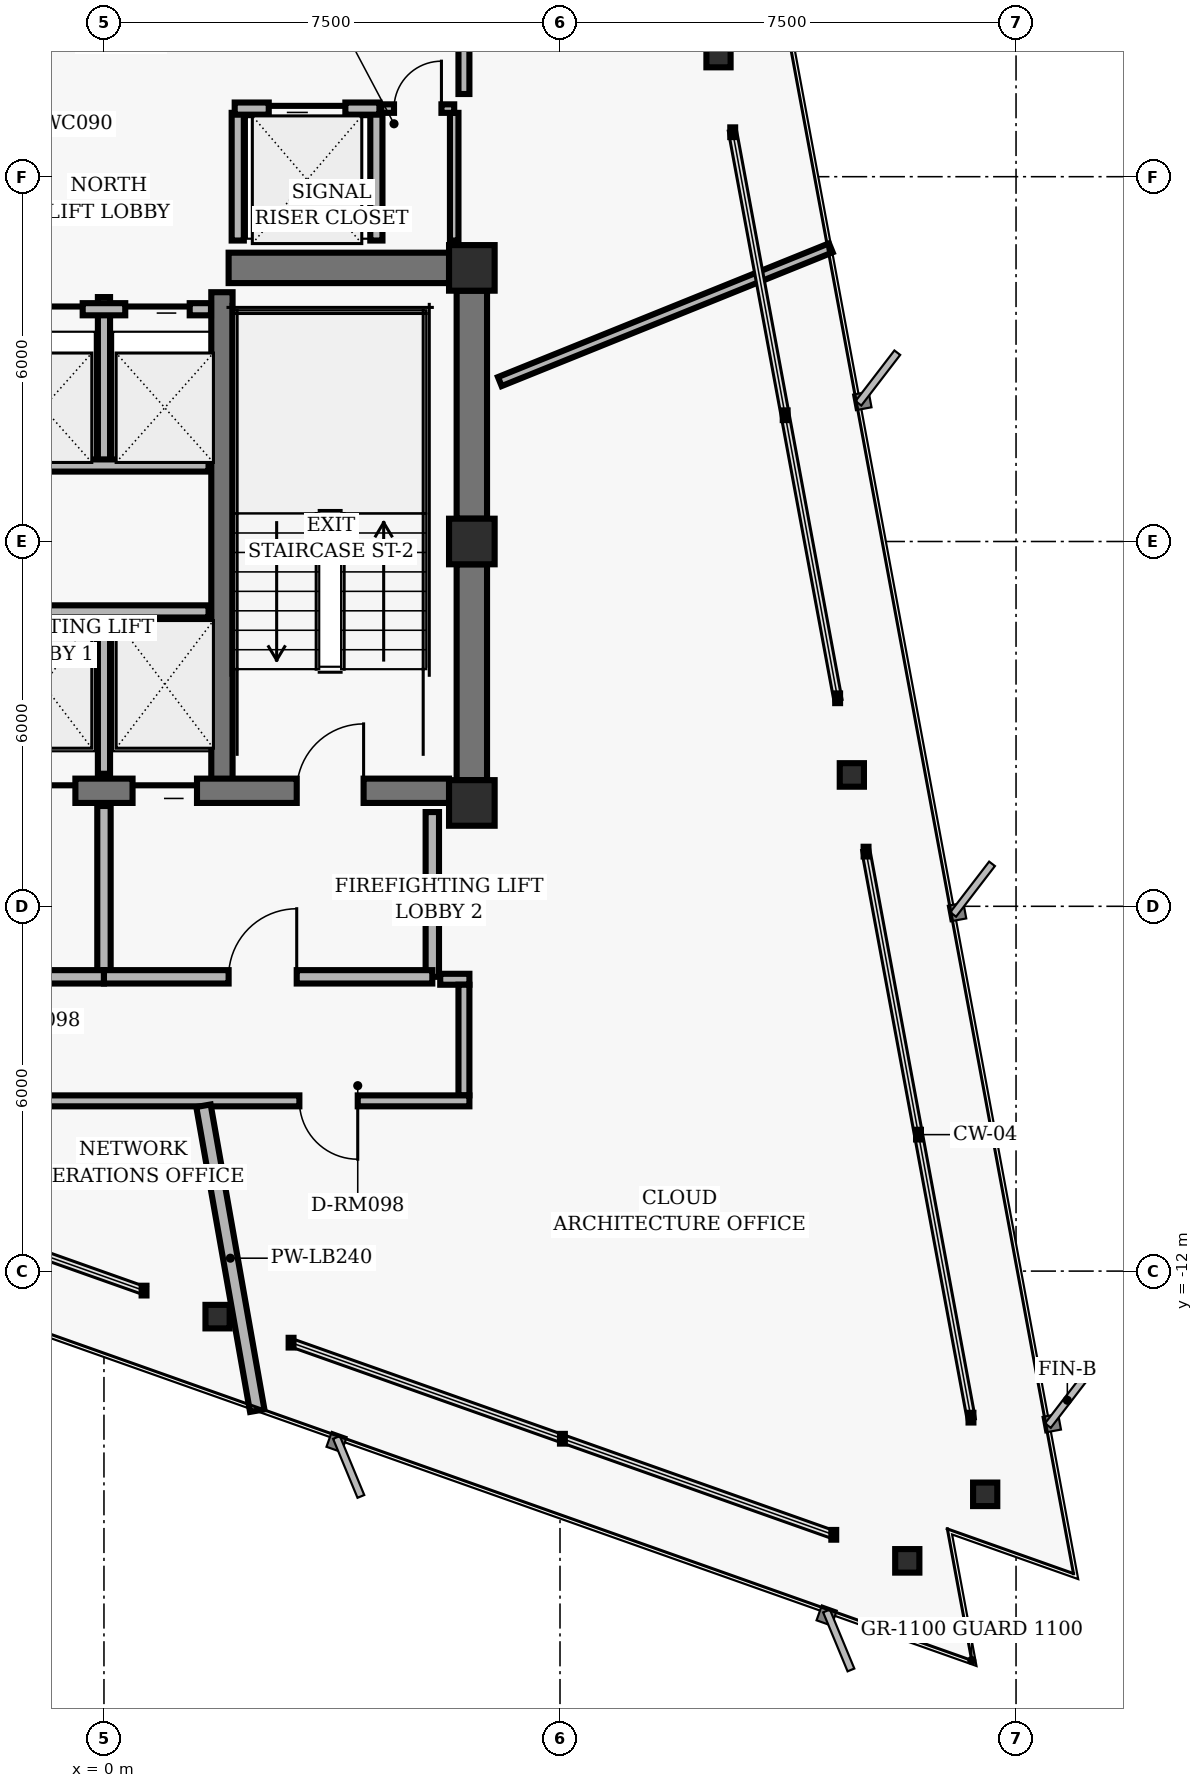
"""IFC4 building model, lengths in metres.
Left out: names, types, materials, properties, quantities, classifications, styles, units other than length and angle.
Written with IfcOpenShell. Run it as: python <this file> out.ifc"""

import sys

from ifc_helpers import new_model, si_unit, direction, frame, frame_2d, origin, origin_2d, place, context, subcontext, project, spatial, rectangle, hollow_rectangle, i_section, extrude, element, fill, save


model = new_model("IFC4")
c1 = context("Model", 3, precision=1e-05, world=origin(), true_north=direction((0.0, 1.0)))
c2 = subcontext(c1, "Body", "Model", "MODEL_VIEW")
j1 = project(units=[si_unit("LENGTHUNIT", "METRE"), si_unit("PLANEANGLEUNIT", "RADIAN")], contexts=[c1])
p1 = place(None, origin())
s1 = spatial("IfcSite", under=j1, at=p1, CompositionType="ELEMENT")
p2 = place(p1, origin())
s2 = spatial("IfcBuilding", under=s1, at=p2, CompositionType="ELEMENT")
p3 = place(p2, frame((0.0, 0.0, 184.48)))
s3 = spatial("IfcBuildingStorey", under=s2, at=p3, CompositionType="ELEMENT", Elevation=184.48)
for number, where, z_axis, x_axis in (
    (1, (6.05, 4.5, 0.0), (0.0, 0.0, 1.0), (1.0, 0.0, 0.0)),
    (2, (6.05, 0.0, 0.0), (0.0, 0.0, 1.0), (1.0, 0.0, 0.0)),
    (3, (6.05, -4.3, 0.0), (0.0, 0.0, 1.0), (1.0, 0.0, 0.0)),
):
    element("IfcColumn", number, at=place(p3, frame(where, z_axis=z_axis, x_axis=x_axis)), inside=s3, PredefinedType="COLUMN", context=c2, shape_type="SweptSolid", body=[
        extrude(hollow_rectangle(XDim=0.75, YDim=0.75, WallThickness=0.05, InnerFilletRadius=0.02, OuterFilletRadius=0.04, at=origin_2d()), origin(), (0.0, 0.0, 1.0), 3.04),
    ])
p4 = place(p3, frame((6.05, 0.375, 0.0), z_axis=(0.0, 0.0, 1.0), x_axis=(0.0, 1.0, 0.0)))
e4 = element("IfcWall", 4, at=p4, inside=s3, PredefinedType="SHEAR", context=c2, shape_type="SweptSolid", body=[
    extrude(rectangle(XDim=3.75, YDim=0.5, at=frame_2d((1.875, 0.0))), origin(), (0.0, 0.0, 1.0), 2.798),
])
p5 = place(p3, frame((6.05, -3.925, 0.0), z_axis=(0.0, 0.0, 1.0), x_axis=(0.0, 1.0, 0.0)))
e5 = element("IfcWall", 5, at=p5, inside=s3, PredefinedType="SHEAR", context=c2, shape_type="SweptSolid", body=[
    extrude(rectangle(XDim=3.55, YDim=0.5, at=frame_2d((1.775, 0.0))), origin(), (0.0, 0.0, 1.0), 2.798),
])
p6 = place(p3, frame((1.94, -4.1, 0.0), z_axis=(0.0, 0.0, 1.0), x_axis=(0.0, 1.0, 0.0)))
e6 = element("IfcWall", 6, at=p6, inside=s3, PredefinedType="SHEAR", context=c2, shape_type="SweptSolid", body=[
    extrude(rectangle(XDim=8.2, YDim=0.35, at=frame_2d((4.1, 0.0))), origin(), (0.0, 0.0, 1.0), 2.798),
])
p7 = place(p3, frame((-5.675, -4.1, 0.0), z_axis=(0.0, 0.0, 1.0), x_axis=(1.0, 0.0, 0.0)))
e7 = element("IfcWall", 7, at=p7, inside=s3, PredefinedType="SHEAR", context=c2, shape_type="SweptSolid", body=[
    extrude(rectangle(XDim=11.35, YDim=0.4, at=frame_2d((5.675, 0.0))), origin(), (0.0, 0.0, 1.0), 2.798),
])
p8 = place(p7, frame((1.405, 0.0, 0.0)))
e8 = element("IfcOpeningElement", 8, at=p8, cuts=e7, PredefinedType="OPENING", context=c2, shape_type="SweptSolid", body=[
    extrude(rectangle(XDim=1.1, YDim=2.04, at=frame_2d((0.55, 1.02))), frame((0.0, 0.21, 0.0), z_axis=(0.0, -1.0, 0.0), x_axis=(1.0, 0.0, 0.0)), (0.0, 0.0, 1.0), 0.42),
])
p9 = place(p7, frame((8.845, 0.0, 0.0)))
e9 = element("IfcOpeningElement", 9, at=p9, cuts=e7, PredefinedType="OPENING", context=c2, shape_type="SweptSolid", body=[
    extrude(rectangle(XDim=1.1, YDim=2.04, at=frame_2d((0.55, 1.02))), frame((0.0, 0.21, 0.0), z_axis=(0.0, -1.0, 0.0), x_axis=(1.0, 0.0, 0.0)), (0.0, 0.0, 1.0), 0.42),
])
p10 = place(p7, frame((4.145, 0.0, 0.0)))
e10 = element("IfcOpeningElement", 10, at=p10, cuts=e7, PredefinedType="OPENING", context=c2, shape_type="SweptSolid", body=[
    extrude(rectangle(XDim=1.06, YDim=2.04, at=frame_2d((0.53, 1.02))), frame((0.0, 0.21, 0.0), z_axis=(0.0, -1.0, 0.0), x_axis=(1.0, 0.0, 0.0)), (0.0, 0.0, 1.0), 0.42),
])
p11 = place(p7, frame((6.145, 0.0, 0.0)))
e11 = element("IfcOpeningElement", 11, at=p11, cuts=e7, PredefinedType="OPENING", context=c2, shape_type="SweptSolid", body=[
    extrude(rectangle(XDim=1.06, YDim=2.04, at=frame_2d((0.53, 1.02))), frame((0.0, 0.21, 0.0), z_axis=(0.0, -1.0, 0.0), x_axis=(1.0, 0.0, 0.0)), (0.0, 0.0, 1.0), 0.42),
])
p12 = place(p3, frame((2.05, 4.5, 0.0), z_axis=(0.0, 0.0, 1.0), x_axis=(1.0, 0.0, 0.0)))
e12 = element("IfcWall", 12, at=p12, inside=s3, PredefinedType="SHEAR", context=c2, shape_type="SweptSolid", body=[
    extrude(rectangle(XDim=3.625, YDim=0.5, at=frame_2d((1.812, 0.0))), origin(), (0.0, 0.0, 1.0), 2.798),
])
for number, where, z_axis, x_axis in (
    (13, (14.492, -15.671, 0.0), (0.0, 0.0, 1.0), (1.0, 0.0, 0.0)),
    (14, (12.3, -3.84, 0.0), (0.0, 0.0, 1.0), (1.0, 0.0, 0.0)),
    (15, (10.107, 7.992, 0.0), (0.0, 0.0, 1.0), (1.0, 0.0, 0.0)),
    (16, (1.868, -12.749, 0.0), (0.0, 0.0, 1.0), (1.0, 0.0, 0.0)),
    (17, (13.211, -16.766, 0.0), (0.0, 0.0, 1.0), (1.0, 0.0, 0.0)),
):
    element("IfcColumn", number, at=place(p3, frame(where, z_axis=z_axis, x_axis=x_axis)), inside=s3, PredefinedType="COLUMN", context=c2, shape_type="SweptSolid", body=[
        extrude(i_section(OverallWidth=0.398, OverallDepth=0.387, WebThickness=0.021, FlangeThickness=0.033, FilletRadius=0.018, at=origin_2d()), origin(), (0.0, 0.0, 1.0), 3.04),
    ])
p13 = place(p3, frame((0.0, -3.82, 0.0), z_axis=(0.0, 0.0, 1.0), x_axis=(0.0, 1.0, 0.0)))
e18 = element("IfcWall", 18, at=p13, inside=s3, PredefinedType="PARTITIONING", context=c2, shape_type="SweptSolid", body=[
    extrude(rectangle(XDim=2.67, YDim=0.2, at=frame_2d((1.335, 0.0))), origin(), (0.0, 0.0, 1.0), 2.773),
])
p14 = place(p3, frame((-1.72, -1.15, 0.0), z_axis=(0.0, 0.0, 1.0), x_axis=(1.0, 0.0, 0.0)))
e19 = element("IfcWall", 19, at=p14, inside=s3, PredefinedType="PARTITIONING", context=c2, shape_type="SweptSolid", body=[
    extrude(rectangle(XDim=3.44, YDim=0.2, at=frame_2d((1.72, 0.0))), origin(), (0.0, 0.0, 1.0), 2.773),
])
p15 = place(p3, frame((5.4, -7.16, 0.0), z_axis=(0.0, 0.0, 1.0), x_axis=(0.0, 1.0, 0.0)))
e20 = element("IfcWall", 20, at=p15, inside=s3, PredefinedType="PARTITIONING", context=c2, shape_type="SweptSolid", body=[
    extrude(rectangle(XDim=2.71, YDim=0.22, at=frame_2d((1.355, 0.0))), origin(), (0.0, 0.0, 1.0), 2.773),
])
p16 = place(p3, frame((0.0, -7.16, 0.0), z_axis=(0.0, 0.0, 1.0), x_axis=(0.0, 1.0, 0.0)))
e21 = element("IfcWall", 21, at=p16, inside=s3, PredefinedType="PARTITIONING", context=c2, shape_type="SweptSolid", body=[
    extrude(rectangle(XDim=2.81, YDim=0.22, at=frame_2d((1.405, 0.0))), origin(), (0.0, 0.0, 1.0), 2.773),
])
p17 = place(p3, frame((-5.4, -7.16, 0.0), z_axis=(0.0, 0.0, 1.0), x_axis=(1.0, 0.0, 0.0)))
e22 = element("IfcWall", 22, at=p17, inside=s3, PredefinedType="PARTITIONING", context=c2, shape_type="SweptSolid", body=[
    extrude(rectangle(XDim=5.4, YDim=0.22, at=frame_2d((2.7, 0.0))), origin(), (0.0, 0.0, 1.0), 2.395),
])
p18 = place(p17, frame((2.05, 0.0, 0.0)))
e23 = element("IfcOpeningElement", 23, at=p18, cuts=e22, PredefinedType="OPENING", context=c2, shape_type="SweptSolid", body=[
    extrude(rectangle(XDim=1.12, YDim=2.02, at=frame_2d((0.56, 1.01))), frame((0.0, 0.12, 0.0), z_axis=(0.0, -1.0, 0.0), x_axis=(1.0, 0.0, 0.0)), (0.0, 0.0, 1.0), 0.24),
])
p19 = place(p3, frame((0.0, -7.16, 0.0), z_axis=(0.0, 0.0, 1.0), x_axis=(1.0, 0.0, 0.0)))
e24 = element("IfcWall", 24, at=p19, inside=s3, PredefinedType="PARTITIONING", context=c2, shape_type="SweptSolid", body=[
    extrude(rectangle(XDim=5.4, YDim=0.22, at=frame_2d((2.7, 0.0))), origin(), (0.0, 0.0, 1.0), 2.395),
])
p20 = place(p19, frame((2.05, 0.0, 0.0)))
e25 = element("IfcOpeningElement", 25, at=p20, cuts=e24, PredefinedType="OPENING", context=c2, shape_type="SweptSolid", body=[
    extrude(rectangle(XDim=1.12, YDim=2.02, at=frame_2d((0.56, 1.01))), frame((0.0, 0.12, 0.0), z_axis=(0.0, -1.0, 0.0), x_axis=(1.0, 0.0, 0.0)), (0.0, 0.0, 1.0), 0.24),
])
p21 = place(p3, frame((0.0, 1.25, 0.0), z_axis=(0.0, 0.0, 1.0), x_axis=(0.0, 1.0, 0.0)))
e26 = element("IfcWall", 26, at=p21, inside=s3, PredefinedType="PARTITIONING", context=c2, shape_type="SweptSolid", body=[
    extrude(rectangle(XDim=2.77, YDim=0.2, at=frame_2d((1.385, 0.0))), origin(), (0.0, 0.0, 1.0), 2.773),
])
p22 = place(p3, frame((-1.72, 1.25, 0.0), z_axis=(0.0, 0.0, 1.0), x_axis=(1.0, 0.0, 0.0)))
e27 = element("IfcWall", 27, at=p22, inside=s3, PredefinedType="PARTITIONING", context=c2, shape_type="SweptSolid", body=[
    extrude(rectangle(XDim=3.44, YDim=0.2, at=frame_2d((1.72, 0.0))), origin(), (0.0, 0.0, 1.0), 2.773),
])
p23 = place(p3, frame((-1.76, 3.82, 0.0), z_axis=(0.0, 0.0, 1.0), x_axis=(1.0, 0.0, 0.0)))
e28 = element("IfcWall", 28, at=p23, inside=s3, PredefinedType="PARTITIONING", context=c2, shape_type="SweptSolid", body=[
    extrude(rectangle(XDim=3.52, YDim=0.2, at=frame_2d((1.76, 0.0))), origin(), (0.0, 0.0, 1.0), 2.773),
])
p24 = place(p23, frame((0.35, 0.0, 0.0)))
e29 = element("IfcOpeningElement", 29, at=p24, cuts=e28, PredefinedType="OPENING", context=c2, shape_type="SweptSolid", body=[
    extrude(rectangle(XDim=1.06, YDim=2.04, at=frame_2d((0.53, 1.02))), frame((0.0, 0.11, 0.0), z_axis=(0.0, -1.0, 0.0), x_axis=(1.0, 0.0, 0.0)), (0.0, 0.0, 1.0), 0.22),
])
p25 = place(p23, frame((2.11, 0.0, 0.0)))
e30 = element("IfcOpeningElement", 30, at=p25, cuts=e28, PredefinedType="OPENING", context=c2, shape_type="SweptSolid", body=[
    extrude(rectangle(XDim=1.06, YDim=2.04, at=frame_2d((0.53, 1.02))), frame((0.0, 0.11, 0.0), z_axis=(0.0, -1.0, 0.0), x_axis=(1.0, 0.0, 0.0)), (0.0, 0.0, 1.0), 0.22),
])
for number, where, z_axis, x_axis in (
    (31, (2.2, 4.95, 0.0), (0.0, 0.0, 1.0), (0.0, 1.0, 0.0)),
    (32, (4.48, 4.95, 0.0), (0.0, 0.0, 1.0), (0.0, 1.0, 0.0)),
):
    element("IfcWall", number, at=place(p3, frame(where, z_axis=z_axis, x_axis=x_axis)), inside=s3, PredefinedType="PARTITIONING", context=c2, shape_type="SweptSolid", body=[
        extrude(rectangle(XDim=2.1, YDim=0.2, at=frame_2d((1.05, 0.0))), origin(), (0.0, 0.0, 1.0), 2.773),
    ])
p26 = place(p3, frame((2.15, 7.12, 0.0), z_axis=(0.0, 0.0, 1.0), x_axis=(1.0, 0.0, 0.0)))
e33 = element("IfcWall", 33, at=p26, inside=s3, PredefinedType="PARTITIONING", context=c2, shape_type="SweptSolid", body=[
    extrude(rectangle(XDim=2.38, YDim=0.2, at=frame_2d((1.19, 0.0))), origin(), (0.0, 0.0, 1.0), 2.773),
])
p27 = place(p26, frame((0.56, 0.0, 0.0)))
e34 = element("IfcOpeningElement", 34, at=p27, cuts=e33, PredefinedType="OPENING", context=c2, shape_type="SweptSolid", body=[
    extrude(rectangle(XDim=1.26, YDim=2.06, at=frame_2d((0.63, 1.03))), frame((0.0, 0.11, 0.0), z_axis=(0.0, -1.0, 0.0), x_axis=(1.0, 0.0, 0.0)), (0.0, 0.0, 1.0), 0.22),
])
p28 = place(p3, frame((5.76, 4.95, 0.0), z_axis=(0.0, 0.0, 1.0), x_axis=(0.0, 1.0, 0.0)))
e35 = element("IfcWall", 35, at=p28, inside=s3, PredefinedType="PARTITIONING", context=c2, shape_type="SweptSolid", body=[
    extrude(rectangle(XDim=2.1, YDim=0.14, at=frame_2d((1.05, 0.0))), origin(), (0.0, 0.0, 1.0), 2.253),
])
p29 = place(p3, frame((4.56, 7.12, 0.0), z_axis=(0.0, 0.0, 1.0), x_axis=(1.0, 0.0, 0.0)))
e36 = element("IfcWall", 36, at=p29, inside=s3, PredefinedType="PARTITIONING", context=c2, shape_type="SweptSolid", body=[
    extrude(rectangle(XDim=1.2, YDim=0.14, at=frame_2d((0.6, 0.0))), origin(), (0.0, 0.0, 1.0), 2.773),
])
p30 = place(p29, frame((0.21, 0.0, 0.0)))
e37 = element("IfcOpeningElement", 37, at=p30, cuts=e36, PredefinedType="OPENING", context=c2, shape_type="SweptSolid", body=[
    extrude(rectangle(XDim=0.78, YDim=2.01, at=frame_2d((0.39, 1.005))), frame((0.0, 0.08, 0.0), z_axis=(0.0, -1.0, 0.0), x_axis=(1.0, 0.0, 0.0)), (0.0, 0.0, 1.0), 0.16),
])
p31 = place(p3, frame((5.92, 9.16, 0.0), z_axis=(0.0, 0.0, 1.0), x_axis=(0.0, -1.0, 0.0)))
e38 = element("IfcWall", 38, at=p31, inside=s3, PredefinedType="PARTITIONING", context=c2, shape_type="SweptSolid", body=[
    extrude(rectangle(XDim=1.8, YDim=0.18, at=frame_2d((0.9, 0.0))), origin(), (0.0, 0.0, 1.0), 2.253),
])
p32 = place(p3, frame((5.53, -7.2, 0.0), z_axis=(0.0, 0.0, 1.0), x_axis=(1.0, 0.0, 0.0)))
e39 = element("IfcWall", 39, at=p32, inside=s3, PredefinedType="PARTITIONING", context=c2, shape_type="SweptSolid", body=[
    extrude(rectangle(XDim=0.48, YDim=0.18, at=frame_2d((0.24, 0.0))), origin(), (0.0, 0.0, 1.0), 2.773),
])
p33 = place(p3, frame((5.92, -7.29, 0.0), z_axis=(0.0, 0.0, 1.0), x_axis=(0.0, -1.0, 0.0)))
e40 = element("IfcWall", 40, at=p33, inside=s3, PredefinedType="PARTITIONING", context=c2, shape_type="SweptSolid", body=[
    extrude(rectangle(XDim=1.82, YDim=0.18, at=frame_2d((0.91, 0.0))), origin(), (0.0, 0.0, 1.0), 2.773),
])
p34 = place(p3, frame((6.01, -9.2, 0.0), z_axis=(0.0, 0.0, 1.0), x_axis=(-1.0, 0.0, 0.0)))
e41 = element("IfcWall", 41, at=p34, inside=s3, PredefinedType="PARTITIONING", context=c2, shape_type="SweptSolid", body=[
    extrude(rectangle(XDim=13.3, YDim=0.18, at=frame_2d((6.65, 0.0))), origin(), (0.0, 0.0, 1.0), 2.395),
])
p35 = place(p34, frame((8.227, 0.0, 0.0)))
e42 = element("IfcOpeningElement", 42, at=p35, cuts=e41, PredefinedType="OPENING", context=c2, shape_type="SweptSolid", body=[
    extrude(rectangle(XDim=0.96, YDim=2.02, at=frame_2d((0.48, 1.01))), frame((0.0, 0.1, 0.0), z_axis=(0.0, -1.0, 0.0), x_axis=(1.0, 0.0, 0.0)), (0.0, 0.0, 1.0), 0.2),
])
p36 = place(p34, frame((1.836, 0.0, 0.0)))
e43 = element("IfcOpeningElement", 43, at=p36, cuts=e41, PredefinedType="OPENING", context=c2, shape_type="SweptSolid", body=[
    extrude(rectangle(XDim=0.96, YDim=2.02, at=frame_2d((0.48, 1.01))), frame((0.0, 0.1, 0.0), z_axis=(0.0, -1.0, 0.0), x_axis=(1.0, 0.0, 0.0)), (0.0, 0.0, 1.0), 0.2),
])
p37 = place(p3, frame((1.636, -9.28, 0.0), z_axis=(0.0, 0.0, 1.0), x_axis=(0.173634919368, -0.984810090716, 0.0)))
e44 = element("IfcWall", 44, at=p37, inside=s3, PredefinedType="PARTITIONING", context=c2, shape_type="SweptSolid", body=[
    extrude(rectangle(XDim=5.093, YDim=0.24, at=frame_2d((2.546, 0.0))), origin(), (0.0, 0.0, 1.0), 2.773),
])
p38 = place(p3, frame((6.51, 2.63, 0.0), z_axis=(0.0, 0.0, 1.0), x_axis=(0.927189354085, 0.374592981342, 0.0)))
e45 = element("IfcWall", 45, at=p38, inside=s3, PredefinedType="PARTITIONING", context=c2, shape_type="SweptSolid", body=[
    extrude(rectangle(XDim=5.872, YDim=0.16, at=frame_2d((2.936, 0.0))), origin(), (0.0, 0.0, 1.0), 2.773),
])
p39 = place(p9, origin())
e46 = element("IfcDoor", 46, at=p39, inside=s3, OperationType="SINGLE_SWING_RIGHT", PredefinedType="DOOR", context=c2, shape_type="SweptSolid", body=[
    extrude(rectangle(XDim=1.1, YDim=2.04, at=frame_2d((0.55, 1.02))), frame((0.0, 0.025, 0.0), z_axis=(0.0, -1.0, 0.0), x_axis=(1.0, 0.0, 0.0)), (0.0, 0.0, 1.0), 0.05),
])
fill(e9, e46)
p40 = place(p10, origin())
e47 = element("IfcDoor", 47, at=p40, inside=s3, OperationType="SLIDING_TO_LEFT", PredefinedType="DOOR", context=c2, shape_type="SweptSolid", body=[
    extrude(rectangle(XDim=1.06, YDim=2.04, at=frame_2d((0.53, 1.02))), frame((0.0, 0.025, 0.0), z_axis=(0.0, -1.0, 0.0), x_axis=(1.0, 0.0, 0.0)), (0.0, 0.0, 1.0), 0.05),
])
fill(e10, e47)
p41 = place(p11, origin())
e48 = element("IfcDoor", 48, at=p41, inside=s3, OperationType="SLIDING_TO_RIGHT", PredefinedType="DOOR", context=c2, shape_type="SweptSolid", body=[
    extrude(rectangle(XDim=1.06, YDim=2.04, at=frame_2d((0.53, 1.02))), frame((0.0, 0.025, 0.0), z_axis=(0.0, -1.0, 0.0), x_axis=(1.0, 0.0, 0.0)), (0.0, 0.0, 1.0), 0.05),
])
fill(e11, e48)
p42 = place(p20, origin())
e49 = element("IfcDoor", 49, at=p42, inside=s3, OperationType="SINGLE_SWING_RIGHT", PredefinedType="DOOR", context=c2, shape_type="SweptSolid", body=[
    extrude(rectangle(XDim=1.12, YDim=2.02, at=frame_2d((0.56, 1.01))), frame((0.0, 0.025, 0.0), z_axis=(0.0, -1.0, 0.0), x_axis=(1.0, 0.0, 0.0)), (0.0, 0.0, 1.0), 0.05),
])
fill(e25, e49)
p43 = place(p24, origin())
e50 = element("IfcDoor", 50, at=p43, inside=s3, OperationType="SLIDING_TO_LEFT", PredefinedType="DOOR", context=c2, shape_type="SweptSolid", body=[
    extrude(rectangle(XDim=1.06, YDim=2.04, at=frame_2d((0.53, 1.02))), frame((0.0, 0.025, 0.0), z_axis=(0.0, -1.0, 0.0), x_axis=(1.0, 0.0, 0.0)), (0.0, 0.0, 1.0), 0.05),
])
fill(e29, e50)
p44 = place(p25, origin())
e51 = element("IfcDoor", 51, at=p44, inside=s3, OperationType="SLIDING_TO_RIGHT", PredefinedType="DOOR", context=c2, shape_type="SweptSolid", body=[
    extrude(rectangle(XDim=1.06, YDim=2.04, at=frame_2d((0.53, 1.02))), frame((0.0, 0.025, 0.0), z_axis=(0.0, -1.0, 0.0), x_axis=(1.0, 0.0, 0.0)), (0.0, 0.0, 1.0), 0.05),
])
fill(e30, e51)
p45 = place(p27, origin())
e52 = element("IfcDoor", 52, at=p45, inside=s3, OperationType="SLIDING_TO_LEFT", PredefinedType="DOOR", context=c2, shape_type="SweptSolid", body=[
    extrude(rectangle(XDim=1.26, YDim=2.06, at=frame_2d((0.63, 1.03))), frame((0.0, 0.025, 0.0), z_axis=(0.0, -1.0, 0.0), x_axis=(1.0, 0.0, 0.0)), (0.0, 0.0, 1.0), 0.05),
])
fill(e34, e52)
p46 = place(p30, origin())
e53 = element("IfcDoor", 53, at=p46, inside=s3, OperationType="SINGLE_SWING_RIGHT", PredefinedType="DOOR", context=c2, shape_type="SweptSolid", body=[
    extrude(rectangle(XDim=0.78, YDim=2.01, at=frame_2d((0.39, 1.005))), frame((0.0, 0.025, 0.0), z_axis=(0.0, -1.0, 0.0), x_axis=(1.0, 0.0, 0.0)), (0.0, 0.0, 1.0), 0.05),
])
fill(e37, e53)
p47 = place(p36, origin())
e54 = element("IfcDoor", 54, at=p47, inside=s3, OperationType="SINGLE_SWING_LEFT", PredefinedType="DOOR", context=c2, shape_type="SweptSolid", body=[
    extrude(rectangle(XDim=0.96, YDim=2.02, at=frame_2d((0.48, 1.01))), frame((0.0, 0.025, 0.0), z_axis=(0.0, -1.0, 0.0), x_axis=(1.0, 0.0, 0.0)), (0.0, 0.0, 1.0), 0.05),
])
fill(e43, e54)
save(model, sys.argv[1])
